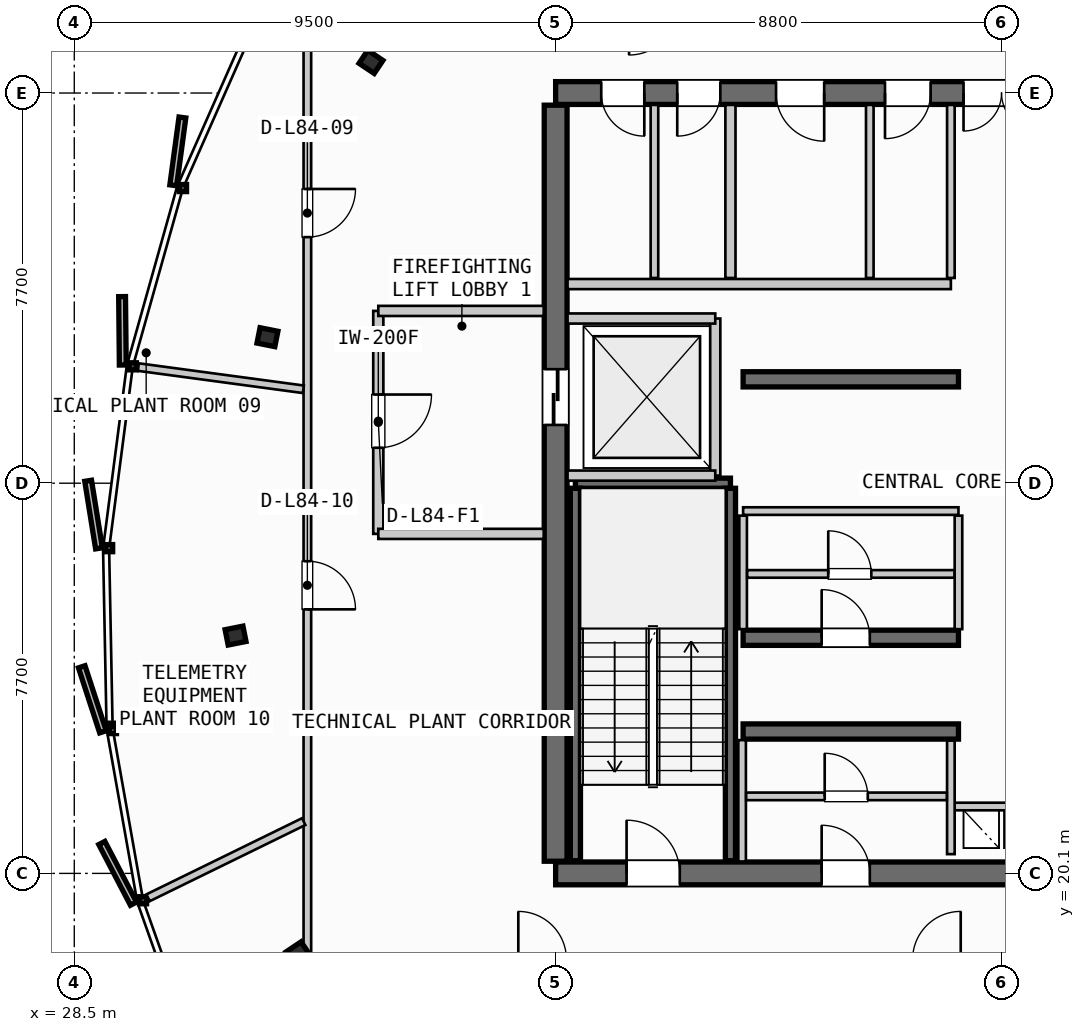
"""IFC4 building model, lengths in metres.
Left out: names, types, materials, properties, quantities, classifications, styles, units other than length and angle.
Written with IfcOpenShell. Run it as: python <this file> out.ifc"""

import sys

from ifc_helpers import new_model, si_unit, direction, frame, frame_2d, origin, origin_2d, place, context, subcontext, project, spatial, rectangle, i_section, extrude, source, transform, mapped, element, fill, save


model = new_model("IFC4")
c1 = context("Model", 3, precision=1e-05, world=origin(), true_north=direction((0.0, 1.0)))
c2 = subcontext(c1, "Body", "Model", "MODEL_VIEW")
j1 = project(units=[si_unit("LENGTHUNIT", "METRE"), si_unit("PLANEANGLEUNIT", "RADIAN")], contexts=[c1])
p1 = place(None, origin())
s1 = spatial("IfcSite", under=j1, at=p1, CompositionType="ELEMENT")
p2 = place(p1, origin())
s2 = spatial("IfcBuilding", under=s1, at=p2, CompositionType="ELEMENT")
p3 = place(p2, frame((0.0, 0.0, 316.3)))
s3 = spatial("IfcBuildingStorey", under=s2, at=p3, CompositionType="ELEMENT", Elevation=316.3)
p4 = place(p3, frame((38.0, 20.1, 0.0), z_axis=(0.0, 0.0, 1.0), x_axis=(1.0, 0.0, 0.0)))
e1 = element("IfcWall", 1, at=p4, inside=s3, PredefinedType="SHEAR", context=c2, shape_type="SweptSolid", body=[
    extrude(rectangle(XDim=17.6, YDim=0.45, at=frame_2d((8.8, 0.0))), origin(), (0.0, 0.0, 1.0), 3.735),
])
p5 = place(p4, frame((1.4, 0.0, 0.0)))
e2 = element("IfcOpeningElement", 2, at=p5, cuts=e1, PredefinedType="OPENING", context=c2, shape_type="SweptSolid", body=[
    extrude(rectangle(XDim=1.05, YDim=2.15, at=frame_2d((0.525, 1.075))), frame((0.0, 0.235, 0.0), z_axis=(0.0, -1.0, 0.0), x_axis=(1.0, 0.0, 0.0)), (0.0, 0.0, 1.0), 0.47),
])
p6 = place(p4, frame((15.15, 0.0, 0.0)))
e3 = element("IfcOpeningElement", 3, at=p6, cuts=e1, PredefinedType="OPENING", context=c2, shape_type="SweptSolid", body=[
    extrude(rectangle(XDim=1.05, YDim=2.15, at=frame_2d((0.525, 1.075))), frame((0.0, 0.235, 0.0), z_axis=(0.0, -1.0, 0.0), x_axis=(1.0, 0.0, 0.0)), (0.0, 0.0, 1.0), 0.47),
])
p7 = place(p4, frame((5.25, 0.0, 0.0)))
e4 = element("IfcOpeningElement", 4, at=p7, cuts=e1, PredefinedType="OPENING", context=c2, shape_type="SweptSolid", body=[
    extrude(rectangle(XDim=0.95, YDim=2.15, at=frame_2d((0.475, 1.075))), frame((0.0, 0.235, 0.0), z_axis=(0.0, -1.0, 0.0), x_axis=(1.0, 0.0, 0.0)), (0.0, 0.0, 1.0), 0.47),
])
p8 = place(p4, frame((11.4, 0.0, 0.0)))
e5 = element("IfcOpeningElement", 5, at=p8, cuts=e1, PredefinedType="OPENING", context=c2, shape_type="SweptSolid", body=[
    extrude(rectangle(XDim=0.95, YDim=2.15, at=frame_2d((0.475, 1.075))), frame((0.0, 0.235, 0.0), z_axis=(0.0, -1.0, 0.0), x_axis=(1.0, 0.0, 0.0)), (0.0, 0.0, 1.0), 0.47),
])
p9 = place(p3, frame((55.6, 35.5, 0.0), z_axis=(0.0, 0.0, 1.0), x_axis=(-1.0, 0.0, 0.0)))
e6 = element("IfcWall", 6, at=p9, inside=s3, PredefinedType="SHEAR", context=c2, shape_type="SweptSolid", body=[
    extrude(rectangle(XDim=17.6, YDim=0.45, at=frame_2d((8.8, 0.0))), origin(), (0.0, 0.0, 1.0), 3.735),
])
p10 = place(p9, frame((8.05, 0.0, 0.0)))
e7 = element("IfcOpeningElement", 7, at=p10, cuts=e6, PredefinedType="OPENING", context=c2, shape_type="SweptSolid", body=[
    extrude(rectangle(XDim=1.5, YDim=2.2, at=frame_2d((0.75, 1.1))), frame((0.0, 0.235, 0.0), z_axis=(0.0, -1.0, 0.0), x_axis=(1.0, 0.0, 0.0)), (0.0, 0.0, 1.0), 0.47),
])
p11 = place(p9, frame((15.85, 0.0, 0.0)))
e8 = element("IfcOpeningElement", 8, at=p11, cuts=e6, PredefinedType="OPENING", context=c2, shape_type="SweptSolid", body=[
    extrude(rectangle(XDim=0.85, YDim=2.15, at=frame_2d((0.425, 1.075))), frame((0.0, 0.235, 0.0), z_axis=(0.0, -1.0, 0.0), x_axis=(1.0, 0.0, 0.0)), (0.0, 0.0, 1.0), 0.47),
])
p12 = place(p9, frame((14.35, 0.0, 0.0)))
e9 = element("IfcOpeningElement", 9, at=p12, cuts=e6, PredefinedType="OPENING", context=c2, shape_type="SweptSolid", body=[
    extrude(rectangle(XDim=0.85, YDim=2.15, at=frame_2d((0.425, 1.075))), frame((0.0, 0.235, 0.0), z_axis=(0.0, -1.0, 0.0), x_axis=(1.0, 0.0, 0.0)), (0.0, 0.0, 1.0), 0.47),
])
p13 = place(p9, frame((12.3, 0.0, 0.0)))
e10 = element("IfcOpeningElement", 10, at=p13, cuts=e6, PredefinedType="OPENING", context=c2, shape_type="SweptSolid", body=[
    extrude(rectangle(XDim=0.95, YDim=2.15, at=frame_2d((0.475, 1.075))), frame((0.0, 0.235, 0.0), z_axis=(0.0, -1.0, 0.0), x_axis=(1.0, 0.0, 0.0)), (0.0, 0.0, 1.0), 0.47),
])
p14 = place(p9, frame((10.2, 0.0, 0.0)))
e11 = element("IfcOpeningElement", 11, at=p14, cuts=e6, PredefinedType="OPENING", context=c2, shape_type="SweptSolid", body=[
    extrude(rectangle(XDim=0.9, YDim=2.15, at=frame_2d((0.45, 1.075))), frame((0.0, 0.235, 0.0), z_axis=(0.0, -1.0, 0.0), x_axis=(1.0, 0.0, 0.0)), (0.0, 0.0, 1.0), 0.47),
])
p15 = place(p3, frame((38.0, 35.26, 0.0), z_axis=(0.0, 0.0, 1.0), x_axis=(0.0, -1.0, 0.0)))
e12 = element("IfcWall", 12, at=p15, inside=s3, PredefinedType="SHEAR", context=c2, shape_type="SweptSolid", body=[
    extrude(rectangle(XDim=14.92, YDim=0.45, at=frame_2d((7.46, 0.0))), origin(), (0.0, 0.0, 1.0), 3.735),
])
p16 = place(p15, frame((5.21, 0.0, 0.0)))
e13 = element("IfcOpeningElement", 13, at=p16, cuts=e12, PredefinedType="OPENING", context=c2, shape_type="SweptSolid", body=[
    extrude(rectangle(XDim=1.1, YDim=2.2, at=frame_2d((0.55, 1.1))), frame((0.0, 0.235, 0.0), z_axis=(0.0, -1.0, 0.0), x_axis=(1.0, 0.0, 0.0)), (0.0, 0.0, 1.0), 0.47),
])
p17 = place(p3, frame((41.7, 22.9, 0.0), z_axis=(0.0, 0.0, 1.0), x_axis=(1.0, 0.0, 0.0)))
e14 = element("IfcWall", 14, at=p17, inside=s3, PredefinedType="SHEAR", context=c2, shape_type="SweptSolid", body=[
    extrude(rectangle(XDim=4.25, YDim=0.3, at=frame_2d((2.125, 0.0))), origin(), (0.0, 0.0, 1.0), 3.735),
])
p18 = place(p3, frame((41.7, 24.75, 0.0), z_axis=(0.0, 0.0, 1.0), x_axis=(1.0, 0.0, 0.0)))
e15 = element("IfcWall", 15, at=p18, inside=s3, PredefinedType="SHEAR", context=c2, shape_type="SweptSolid", body=[
    extrude(rectangle(XDim=4.25, YDim=0.3, at=frame_2d((2.125, 0.0))), origin(), (0.0, 0.0, 1.0), 3.735),
])
p19 = place(p18, frame((1.55, 0.0, 0.0)))
e16 = element("IfcOpeningElement", 16, at=p19, cuts=e15, PredefinedType="OPENING", context=c2, shape_type="SweptSolid", body=[
    extrude(rectangle(XDim=0.95, YDim=2.15, at=frame_2d((0.475, 1.075))), frame((0.0, 0.16, 0.0), z_axis=(0.0, -1.0, 0.0), x_axis=(1.0, 0.0, 0.0)), (0.0, 0.0, 1.0), 0.32),
])
p20 = place(p3, frame((41.7, 29.85, 0.0), z_axis=(0.0, 0.0, 1.0), x_axis=(1.0, 0.0, 0.0)))
e17 = element("IfcWall", 17, at=p20, inside=s3, PredefinedType="SHEAR", context=c2, shape_type="SweptSolid", body=[
    extrude(rectangle(XDim=4.25, YDim=0.3, at=frame_2d((2.125, 0.0))), origin(), (0.0, 0.0, 1.0), 3.735),
])
m1 = source(origin(), c2, "Body", "SweptSolid", [
    extrude(i_section(OverallWidth=0.309, OverallDepth=0.359, WebThickness=0.016, FlangeThickness=0.026, FilletRadius=0.027, at=origin_2d()), origin(), (0.0, 0.0, 1.0), 3.735),
])
for number, where, z_axis, x_axis in (
    (18, (34.356, 36.115, 0.0), (0.0, 0.0, 1.0), (-0.831, 0.556, 0.0)),
    (19, (32.312, 30.682, 0.0), (0.0, 0.0, 1.0), (-0.981, 0.195, 0.0)),
    (20, (31.683, 24.793, 0.0), (0.0, 0.0, 1.0), (-0.981, -0.195, 0.0)),
    (21, (32.913, 18.521, 0.0), (0.0, 0.0, 1.0), (-0.831, -0.556, 0.0)),
):
    element("IfcColumn", number, at=place(p3, frame(where, z_axis=z_axis, x_axis=x_axis)), inside=s3, PredefinedType="COLUMN", context=c2, shape_type="MappedRepresentation", body=[
        mapped(m1, transform((0.0, 0.0, 0.0), scale=1.0)),
    ])
p21 = place(p3, frame((38.39, 27.8, 0.0), z_axis=(0.0, 0.0, 1.0), x_axis=(1.0, 0.0, 0.0)))
e22 = element("IfcWall", 22, at=p21, inside=s3, PredefinedType="SHEAR", context=c2, shape_type="SweptSolid", body=[
    extrude(rectangle(XDim=3.06, YDim=0.2, at=frame_2d((1.53, 0.0))), origin(), (0.0, 0.0, 1.0), 3.735),
])
for number, where, z_axis, x_axis in (
    (23, (41.45, 27.7, 0.0), (0.0, 0.0, 1.0), (0.0, -1.0, 0.0)),
    (24, (38.39, 20.35, 0.0), (0.0, 0.0, 1.0), (0.0, 1.0, 0.0)),
):
    element("IfcWall", number, at=place(p3, frame(where, z_axis=z_axis, x_axis=x_axis)), inside=s3, PredefinedType="SHEAR", context=c2, shape_type="SweptSolid", body=[
        extrude(rectangle(XDim=7.35, YDim=0.2, at=frame_2d((3.675, 0.0))), origin(), (0.0, 0.0, 1.0), 3.735),
    ])
p22 = place(p3, frame((45.8, 21.42, 0.0), z_axis=(0.0, 0.0, 1.0), x_axis=(1.0, 0.0, 0.0)))
e25 = element("IfcWall", 25, at=p22, inside=s3, PredefinedType="PARTITIONING", context=c2, shape_type="SweptSolid", body=[
    extrude(rectangle(XDim=2.0, YDim=0.15, at=frame_2d((1.0, 0.0))), origin(), (0.0, 0.0, 1.0), 3.26),
])
p23 = place(p3, frame((45.8, 20.48, 0.0), z_axis=(0.0, 0.0, 1.0), x_axis=(0.0, 1.0, 0.0)))
e26 = element("IfcWall", 26, at=p23, inside=s3, PredefinedType="PARTITIONING", context=c2, shape_type="SweptSolid", body=[
    extrude(rectangle(XDim=2.24, YDim=0.15, at=frame_2d((1.12, 0.0))), origin(), (0.0, 0.0, 1.0), 3.26),
])
p24 = place(p3, frame((41.15, 27.95, 0.0), z_axis=(0.0, 0.0, 1.0), x_axis=(0.0, 1.0, 0.0)))
e27 = element("IfcWall", 27, at=p24, inside=s3, PredefinedType="PARTITIONING", context=c2, shape_type="SweptSolid", body=[
    extrude(rectangle(XDim=3.1, YDim=0.2, at=frame_2d((1.55, 0.0))), origin(), (0.0, 0.0, 1.0), 3.26),
])
for number, where, z_axis, x_axis in (
    (28, (38.235, 27.95, 0.0), (0.0, 0.0, 1.0), (1.0, 0.0, 0.0)),
    (29, (38.235, 31.05, 0.0), (0.0, 0.0, 1.0), (1.0, 0.0, 0.0)),
):
    element("IfcWall", number, at=place(p3, frame(where, z_axis=z_axis, x_axis=x_axis)), inside=s3, PredefinedType="PARTITIONING", context=c2, shape_type="SweptSolid", body=[
        extrude(rectangle(XDim=2.915, YDim=0.2, at=frame_2d((1.458, 0.0))), origin(), (0.0, 0.0, 1.0), 3.26),
    ])
p25 = place(p3, frame((34.5, 31.2, 0.0), z_axis=(0.0, 0.0, 1.0), x_axis=(0.0, -1.0, 0.0)))
e30 = element("IfcWall", 30, at=p25, inside=s3, PredefinedType="PARTITIONING", context=c2, shape_type="SweptSolid", body=[
    extrude(rectangle(XDim=4.4, YDim=0.2, at=frame_2d((2.2, 0.0))), origin(), (0.0, 0.0, 1.0), 3.26),
])
p26 = place(p25, frame((1.65, 0.0, 0.0)))
e31 = element("IfcOpeningElement", 31, at=p26, cuts=e30, PredefinedType="OPENING", context=c2, shape_type="SweptSolid", body=[
    extrude(rectangle(XDim=1.05, YDim=2.15, at=frame_2d((0.525, 1.075))), frame((0.0, 0.11, 0.0), z_axis=(0.0, -1.0, 0.0), x_axis=(1.0, 0.0, 0.0)), (0.0, 0.0, 1.0), 0.22),
])
for number, where, z_axis, x_axis in (
    (32, (34.5, 26.8, 0.0), (0.0, 0.0, 1.0), (1.0, 0.0, 0.0)),
    (33, (34.5, 31.2, 0.0), (0.0, 0.0, 1.0), (1.0, 0.0, 0.0)),
):
    element("IfcWall", number, at=place(p3, frame(where, z_axis=z_axis, x_axis=x_axis)), inside=s3, PredefinedType="PARTITIONING", context=c2, shape_type="SweptSolid", body=[
        extrude(rectangle(XDim=3.265, YDim=0.2, at=frame_2d((1.632, 0.0))), origin(), (0.0, 0.0, 1.0), 3.26),
    ])
p27 = place(p3, frame((41.68, 20.335, 0.0), z_axis=(0.0, 0.0, 1.0), x_axis=(0.0, 1.0, 0.0)))
e34 = element("IfcWall", 34, at=p27, inside=s3, PredefinedType="PARTITIONING", context=c2, shape_type="SweptSolid", body=[
    extrude(rectangle(XDim=2.395, YDim=0.15, at=frame_2d((1.198, 0.0))), origin(), (0.0, 0.0, 1.0), 3.26),
])
p28 = place(p3, frame((41.76, 21.62, 0.0), z_axis=(0.0, 0.0, 1.0), x_axis=(1.0, 0.0, 0.0)))
e35 = element("IfcWall", 35, at=p28, inside=s3, PredefinedType="PARTITIONING", context=c2, shape_type="SweptSolid", body=[
    extrude(rectangle(XDim=3.96, YDim=0.15, at=frame_2d((1.98, 0.0))), origin(), (0.0, 0.0, 1.0), 3.26),
])
p29 = place(p28, frame((1.55, 0.0, 0.0)))
e36 = element("IfcOpeningElement", 36, at=p29, cuts=e35, PredefinedType="OPENING", context=c2, shape_type="SweptSolid", body=[
    extrude(rectangle(XDim=0.85, YDim=2.15, at=frame_2d((0.425, 1.075))), frame((0.0, 0.085, 0.0), z_axis=(0.0, -1.0, 0.0), x_axis=(1.0, 0.0, 0.0)), (0.0, 0.0, 1.0), 0.17),
])
p30 = place(p3, frame((41.7, 27.25, 0.0), z_axis=(0.0, 0.0, 1.0), x_axis=(1.0, 0.0, 0.0)))
e37 = element("IfcWall", 37, at=p30, inside=s3, PredefinedType="PARTITIONING", context=c2, shape_type="SweptSolid", body=[
    extrude(rectangle(XDim=4.25, YDim=0.15, at=frame_2d((2.125, 0.0))), origin(), (0.0, 0.0, 1.0), 3.26),
])
for number, where, z_axis, x_axis in (
    (38, (41.7, 24.92, 0.0), (0.0, 0.0, 1.0), (0.0, 1.0, 0.0)),
    (39, (45.95, 24.92, 0.0), (0.0, 0.0, 1.0), (0.0, 1.0, 0.0)),
):
    element("IfcWall", number, at=place(p3, frame(where, z_axis=z_axis, x_axis=x_axis)), inside=s3, PredefinedType="PARTITIONING", context=c2, shape_type="SweptSolid", body=[
        extrude(rectangle(XDim=2.24, YDim=0.15, at=frame_2d((1.12, 0.0))), origin(), (0.0, 0.0, 1.0), 3.26),
    ])
p31 = place(p3, frame((41.78, 26.01, 0.0), z_axis=(0.0, 0.0, 1.0), x_axis=(1.0, 0.0, 0.0)))
e40 = element("IfcWall", 40, at=p31, inside=s3, PredefinedType="PARTITIONING", context=c2, shape_type="SweptSolid", body=[
    extrude(rectangle(XDim=4.09, YDim=0.15, at=frame_2d((2.045, 0.0))), origin(), (0.0, 0.0, 1.0), 3.26),
])
p32 = place(p31, frame((1.6, 0.0, 0.0)))
e41 = element("IfcOpeningElement", 41, at=p32, cuts=e40, PredefinedType="OPENING", context=c2, shape_type="SweptSolid", body=[
    extrude(rectangle(XDim=0.85, YDim=2.15, at=frame_2d((0.425, 1.075))), frame((0.0, 0.085, 0.0), z_axis=(0.0, -1.0, 0.0), x_axis=(1.0, 0.0, 0.0)), (0.0, 0.0, 1.0), 0.17),
])
p33 = place(p3, frame((41.45, 31.85, 0.0), z_axis=(0.0, 0.0, 1.0), x_axis=(0.0, 1.0, 0.0)))
e42 = element("IfcWall", 42, at=p33, inside=s3, PredefinedType="PARTITIONING", context=c2, shape_type="SweptSolid", body=[
    extrude(rectangle(XDim=3.415, YDim=0.2, at=frame_2d((1.708, 0.0))), origin(), (0.0, 0.0, 1.0), 3.26),
])
p34 = place(p3, frame((38.235, 31.73, 0.0), z_axis=(0.0, 0.0, 1.0), x_axis=(1.0, 0.0, 0.0)))
e43 = element("IfcWall", 43, at=p34, inside=s3, PredefinedType="PARTITIONING", context=c2, shape_type="SweptSolid", body=[
    extrude(rectangle(XDim=7.565, YDim=0.2, at=frame_2d((3.782, 0.0))), origin(), (0.0, 0.0, 1.0), 3.26),
])
for number, where, z_axis, x_axis in (
    (44, (45.8, 31.85, 0.0), (0.0, 0.0, 1.0), (0.0, 1.0, 0.0)),
    (45, (39.95, 31.85, 0.0), (0.0, 0.0, 1.0), (0.0, 1.0, 0.0)),
):
    element("IfcWall", number, at=place(p3, frame(where, z_axis=z_axis, x_axis=x_axis)), inside=s3, PredefinedType="PARTITIONING", context=c2, shape_type="SweptSolid", body=[
        extrude(rectangle(XDim=3.415, YDim=0.15, at=frame_2d((1.708, 0.0))), origin(), (0.0, 0.0, 1.0), 3.26),
    ])
p35 = place(p3, frame((44.2, 31.85, 0.0), z_axis=(0.0, 0.0, 1.0), x_axis=(0.0, 1.0, 0.0)))
e46 = element("IfcWall", 46, at=p35, inside=s3, PredefinedType="PLUMBINGWALL", context=c2, shape_type="SweptSolid", body=[
    extrude(rectangle(XDim=3.415, YDim=0.15, at=frame_2d((1.708, 0.0))), origin(), (0.0, 0.0, 1.0), 3.26),
])
p36 = place(p3, frame((33.1, 37.2, 0.0), z_axis=(0.0, 0.0, 1.0), x_axis=(0.0, -1.0, 0.0)))
e47 = element("IfcWall", 47, at=p36, inside=s3, PredefinedType="PARTITIONING", context=c2, shape_type="SweptSolid", body=[
    extrude(rectangle(XDim=18.8, YDim=0.15, at=frame_2d((9.4, 0.0))), origin(), (0.0, 0.0, 1.0), 3.26),
])
p37 = place(p36, frame((3.594, 0.0, 0.0)))
e48 = element("IfcOpeningElement", 48, at=p37, cuts=e47, PredefinedType="OPENING", context=c2, shape_type="SweptSolid", body=[
    extrude(rectangle(XDim=0.95, YDim=2.15, at=frame_2d((0.475, 1.075))), frame((0.0, 0.085, 0.0), z_axis=(0.0, -1.0, 0.0), x_axis=(1.0, 0.0, 0.0)), (0.0, 0.0, 1.0), 0.17),
])
p38 = place(p36, frame((10.939, 0.0, 0.0)))
e49 = element("IfcOpeningElement", 49, at=p38, cuts=e47, PredefinedType="OPENING", context=c2, shape_type="SweptSolid", body=[
    extrude(rectangle(XDim=0.95, YDim=2.15, at=frame_2d((0.475, 1.075))), frame((0.0, 0.085, 0.0), z_axis=(0.0, -1.0, 0.0), x_axis=(1.0, 0.0, 0.0)), (0.0, 0.0, 1.0), 0.17),
])
p39 = place(p3, frame((33.028, 21.122, 0.0), z_axis=(0.0, 0.0, 1.0), x_axis=(-0.898192137988, -0.439603097415, 0.0)))
e50 = element("IfcWall", 50, at=p39, inside=s3, PredefinedType="PARTITIONING", context=c2, shape_type="SweptSolid", body=[
    extrude(rectangle(XDim=3.42, YDim=0.15, at=frame_2d((1.71, 0.0))), origin(), (0.0, 0.0, 1.0), 3.26),
])
p40 = place(p3, frame((33.021, 29.654, 0.0), z_axis=(0.0, 0.0, 1.0), x_axis=(-0.99106425122, 0.133385343851, 0.0)))
e51 = element("IfcWall", 51, at=p40, inside=s3, PredefinedType="PARTITIONING", context=c2, shape_type="SweptSolid", body=[
    extrude(rectangle(XDim=3.285, YDim=0.15, at=frame_2d((1.643, 0.0))), origin(), (0.0, 0.0, 1.0), 3.26),
])
m2 = source(origin(), c2, "Body", "SweptSolid", [
    extrude(rectangle(XDim=1.05, YDim=2.15, at=frame_2d((0.525, 1.075))), frame((0.0, 0.025, 0.0), z_axis=(0.0, -1.0, 0.0), x_axis=(1.0, 0.0, 0.0)), (0.0, 0.0, 1.0), 0.05),
])
p41 = place(p5, origin())
e52 = element("IfcDoor", 52, at=p41, inside=s3, OperationType="SINGLE_SWING_LEFT", PredefinedType="DOOR", context=c2, shape_type="MappedRepresentation", body=[
    mapped(m2, transform((0.0, 0.0, 0.0), scale=1.0)),
])
fill(e2, e52)
m3 = source(origin(), c2, "Body", "SweptSolid", [
    extrude(rectangle(XDim=1.5, YDim=2.2, at=frame_2d((0.75, 1.1))), frame((0.0, 0.025, 0.0), z_axis=(0.0, -1.0, 0.0), x_axis=(1.0, 0.0, 0.0)), (0.0, 0.0, 1.0), 0.05),
])
p42 = place(p10, origin())
e53 = element("IfcDoor", 53, at=p42, inside=s3, OperationType="DOUBLE_DOOR_SINGLE_SWING", PredefinedType="DOOR", context=c2, shape_type="MappedRepresentation", body=[
    mapped(m3, transform((0.0, 0.0, 0.0), scale=1.0)),
])
fill(e7, e53)
m4 = source(origin(), c2, "Body", "SweptSolid", [
    extrude(rectangle(XDim=1.1, YDim=2.2, at=frame_2d((0.55, 1.1))), frame((0.0, 0.025, 0.0), z_axis=(0.0, -1.0, 0.0), x_axis=(1.0, 0.0, 0.0)), (0.0, 0.0, 1.0), 0.05),
])
p43 = place(p16, origin())
e54 = element("IfcDoor", 54, at=p43, inside=s3, OperationType="SLIDING_TO_LEFT", PredefinedType="DOOR", context=c2, shape_type="MappedRepresentation", body=[
    mapped(m4, transform((0.0, 0.0, 0.0), scale=1.0)),
])
fill(e13, e54)
m5 = source(origin(), c2, "Body", "SweptSolid", [
    extrude(rectangle(XDim=0.95, YDim=2.15, at=frame_2d((0.475, 1.075))), frame((0.0, 0.025, 0.0), z_axis=(0.0, -1.0, 0.0), x_axis=(1.0, 0.0, 0.0)), (0.0, 0.0, 1.0), 0.05),
])
p44 = place(p7, origin())
e55 = element("IfcDoor", 55, at=p44, inside=s3, OperationType="SINGLE_SWING_LEFT", PredefinedType="DOOR", context=c2, shape_type="MappedRepresentation", body=[
    mapped(m5, transform((0.0, 0.0, 0.0), scale=1.0)),
])
fill(e4, e55)
p45 = place(p19, origin())
e56 = element("IfcDoor", 56, at=p45, inside=s3, OperationType="SINGLE_SWING_LEFT", PredefinedType="DOOR", context=c2, shape_type="MappedRepresentation", body=[
    mapped(m5, transform((0.0, 0.0, 0.0), scale=1.0)),
])
fill(e16, e56)
m6 = source(origin(), c2, "Body", "SweptSolid", [
    extrude(rectangle(XDim=0.85, YDim=2.15, at=frame_2d((0.425, 1.075))), frame((0.0, 0.025, 0.0), z_axis=(0.0, -1.0, 0.0), x_axis=(1.0, 0.0, 0.0)), (0.0, 0.0, 1.0), 0.05),
])
p46 = place(p11, origin())
e57 = element("IfcDoor", 57, at=p46, inside=s3, OperationType="SINGLE_SWING_LEFT", PredefinedType="DOOR", context=c2, shape_type="MappedRepresentation", body=[
    mapped(m6, transform((0.0, 0.0, 0.0), scale=1.0)),
])
fill(e8, e57)
p47 = place(p12, origin())
e58 = element("IfcDoor", 58, at=p47, inside=s3, OperationType="SINGLE_SWING_RIGHT", PredefinedType="DOOR", context=c2, shape_type="MappedRepresentation", body=[
    mapped(m6, transform((0.0, 0.0, 0.0), scale=1.0)),
])
fill(e9, e58)
p48 = place(p13, origin())
e59 = element("IfcDoor", 59, at=p48, inside=s3, OperationType="SINGLE_SWING_LEFT", PredefinedType="DOOR", context=c2, shape_type="MappedRepresentation", body=[
    mapped(m5, transform((0.0, 0.0, 0.0), scale=1.0)),
])
fill(e10, e59)
m7 = source(origin(), c2, "Body", "SweptSolid", [
    extrude(rectangle(XDim=0.9, YDim=2.15, at=frame_2d((0.45, 1.075))), frame((0.0, 0.025, 0.0), z_axis=(0.0, -1.0, 0.0), x_axis=(1.0, 0.0, 0.0)), (0.0, 0.0, 1.0), 0.05),
])
p49 = place(p14, origin())
e60 = element("IfcDoor", 60, at=p49, inside=s3, OperationType="SINGLE_SWING_RIGHT", PredefinedType="DOOR", context=c2, shape_type="MappedRepresentation", body=[
    mapped(m7, transform((0.0, 0.0, 0.0), scale=1.0)),
])
fill(e11, e60)
p50 = place(p26, origin())
e61 = element("IfcDoor", 61, at=p50, inside=s3, OperationType="SINGLE_SWING_LEFT", PredefinedType="DOOR", context=c2, shape_type="MappedRepresentation", body=[
    mapped(m2, transform((0.0, 0.0, 0.0), scale=1.0)),
])
fill(e31, e61)
p51 = place(p29, origin())
e62 = element("IfcDoor", 62, at=p51, inside=s3, OperationType="SINGLE_SWING_LEFT", PredefinedType="DOOR", context=c2, shape_type="MappedRepresentation", body=[
    mapped(m6, transform((0.0, 0.0, 0.0), scale=1.0)),
])
fill(e36, e62)
p52 = place(p32, origin())
e63 = element("IfcDoor", 63, at=p52, inside=s3, OperationType="SINGLE_SWING_LEFT", PredefinedType="DOOR", context=c2, shape_type="MappedRepresentation", body=[
    mapped(m6, transform((0.0, 0.0, 0.0), scale=1.0)),
])
fill(e41, e63)
p53 = place(p37, origin())
e64 = element("IfcDoor", 64, at=p53, inside=s3, OperationType="SINGLE_SWING_LEFT", PredefinedType="DOOR", context=c2, shape_type="MappedRepresentation", body=[
    mapped(m5, transform((0.0, 0.0, 0.0), scale=1.0)),
])
fill(e48, e64)
p54 = place(p38, origin())
e65 = element("IfcDoor", 65, at=p54, inside=s3, OperationType="SINGLE_SWING_RIGHT", PredefinedType="DOOR", context=c2, shape_type="MappedRepresentation", body=[
    mapped(m5, transform((0.0, 0.0, 0.0), scale=1.0)),
])
fill(e49, e65)
save(model, sys.argv[1])
